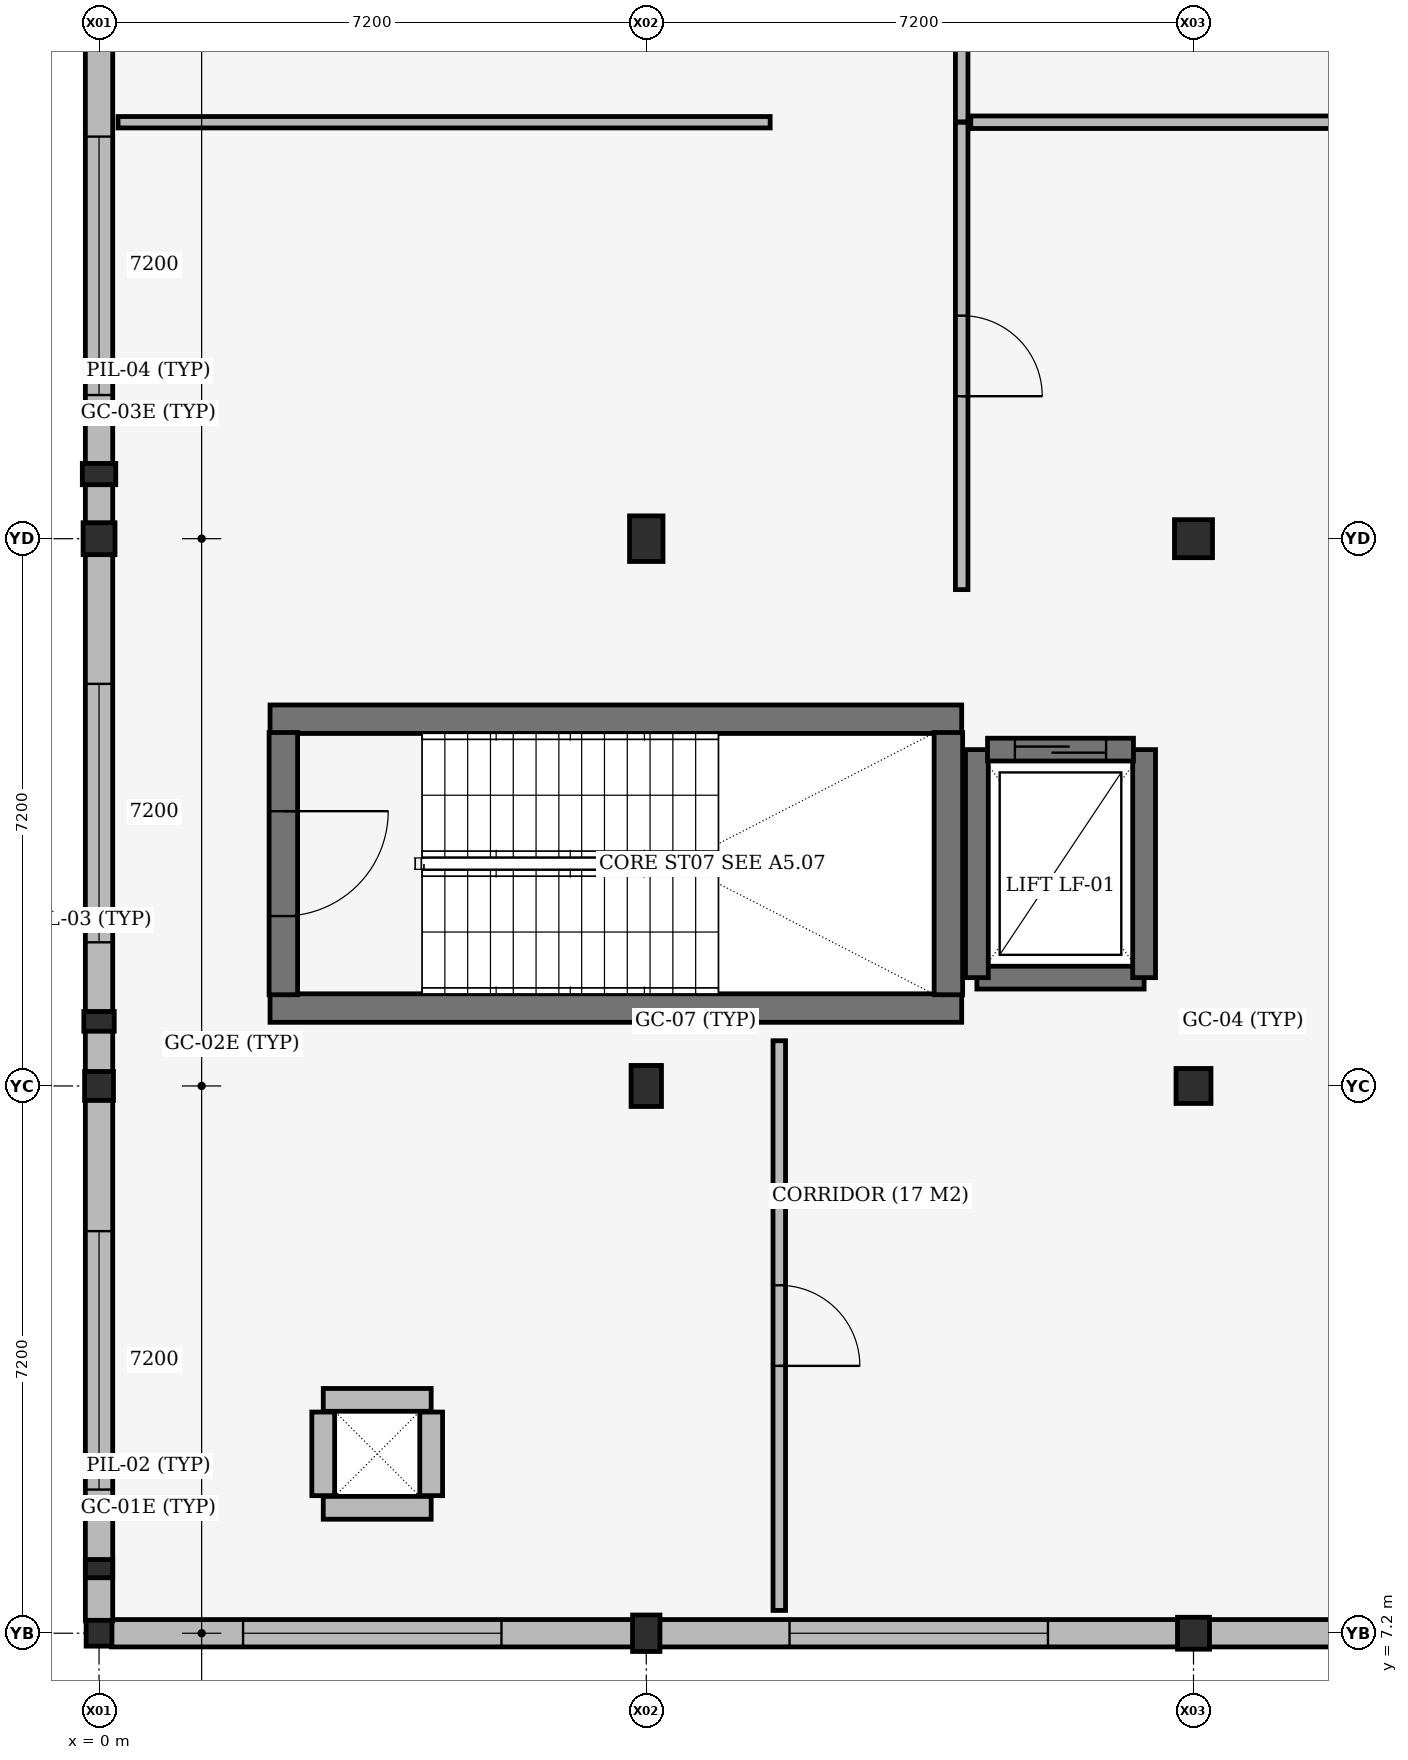
"""IFC4 building model, lengths in metres.
Left out: names, types, materials, properties, quantities, classifications, styles, units other than length and angle.
Written with IfcOpenShell. Run it as: python <this file> out.ifc"""

import sys

from ifc_helpers import new_model, si_unit, direction, frame, frame_2d, origin, origin_2d, place, context, subcontext, project, spatial, rectangle, extrude, element, fill, save


model = new_model("IFC4")
c1 = context("Model", 3, precision=1e-05, world=origin(), true_north=direction((0.0, 1.0)))
c2 = subcontext(c1, "Body", "Model", "MODEL_VIEW")
j1 = project(units=[si_unit("LENGTHUNIT", "METRE"), si_unit("PLANEANGLEUNIT", "RADIAN")], contexts=[c1])
p1 = place(None, origin())
s1 = spatial("IfcSite", under=j1, at=p1, CompositionType="ELEMENT")
p2 = place(p1, origin())
s2 = spatial("IfcBuilding", under=s1, at=p2, CompositionType="ELEMENT")
p3 = place(p2, frame((0.0, 0.0, 9.6)))
s3 = spatial("IfcBuildingStorey", under=s2, at=p3, CompositionType="ELEMENT", Elevation=9.6)
p4 = place(p3, frame((2.95, 8.85, 0.0), z_axis=(0.0, 0.0, 1.0), x_axis=(1.0, 0.0, 0.0)))
e1 = element("IfcWall", 1, at=p4, inside=s3, PredefinedType="SHEAR", context=c2, shape_type="SweptSolid", body=[
    extrude(rectangle(XDim=1.42, YDim=0.3, at=frame_2d((0.71, 0.0))), origin(), (0.0, 0.0, 1.0), 3.96),
])
p5 = place(p3, frame((4.37, 9.01, 0.0), z_axis=(0.0, 0.0, 1.0), x_axis=(0.0, 1.0, 0.0)))
e2 = element("IfcWall", 2, at=p5, inside=s3, PredefinedType="SHEAR", context=c2, shape_type="SweptSolid", body=[
    extrude(rectangle(XDim=1.1, YDim=0.3, at=frame_2d((0.55, 0.0))), origin(), (0.0, 0.0, 1.0), 3.96),
])
p6 = place(p3, frame((4.37, 10.27, 0.0), z_axis=(0.0, 0.0, 1.0), x_axis=(-1.0, 0.0, 0.0)))
e3 = element("IfcWall", 3, at=p6, inside=s3, PredefinedType="SHEAR", context=c2, shape_type="SweptSolid", body=[
    extrude(rectangle(XDim=1.42, YDim=0.3, at=frame_2d((0.71, 0.0))), origin(), (0.0, 0.0, 1.0), 3.96),
])
p7 = place(p3, frame((2.95, 10.11, 0.0), z_axis=(0.0, 0.0, 1.0), x_axis=(0.0, -1.0, 0.0)))
e4 = element("IfcWall", 4, at=p7, inside=s3, PredefinedType="SHEAR", context=c2, shape_type="SweptSolid", body=[
    extrude(rectangle(XDim=1.1, YDim=0.3, at=frame_2d((0.55, 0.0))), origin(), (0.0, 0.0, 1.0), 3.96),
])
p8 = place(p3, frame((0.0, 7.2, 0.0), z_axis=(0.0, 0.0, 1.0), x_axis=(1.0, 0.0, 0.0)))
e5 = element("IfcColumn", 5, at=p8, inside=s3, PredefinedType="COLUMN", context=c2, shape_type="SweptSolid", body=[
    extrude(rectangle(XDim=0.34, YDim=0.34, at=origin_2d()), origin(), (0.0, 0.0, 1.0), 3.89),
])
p9 = place(p3, frame((0.0, 14.4, 0.0), z_axis=(0.0, 0.0, 1.0), x_axis=(1.0, 0.0, 0.0)))
e6 = element("IfcColumn", 6, at=p9, inside=s3, PredefinedType="COLUMN", context=c2, shape_type="SweptSolid", body=[
    extrude(rectangle(XDim=0.38, YDim=0.38, at=origin_2d()), origin(), (0.0, 0.0, 1.0), 3.89),
])
p10 = place(p3, frame((0.0, 21.6, 0.0), z_axis=(0.0, 0.0, 1.0), x_axis=(1.0, 0.0, 0.0)))
e7 = element("IfcColumn", 7, at=p10, inside=s3, PredefinedType="COLUMN", context=c2, shape_type="SweptSolid", body=[
    extrude(rectangle(XDim=0.42, YDim=0.42, at=origin_2d()), origin(), (0.0, 0.0, 1.0), 3.89),
])
p11 = place(p3, frame((7.2, 7.2, 0.0), z_axis=(0.0, 0.0, 1.0), x_axis=(1.0, 0.0, 0.0)))
e8 = element("IfcColumn", 8, at=p11, inside=s3, PredefinedType="COLUMN", context=c2, shape_type="SweptSolid", body=[
    extrude(rectangle(XDim=0.36, YDim=0.48, at=origin_2d()), origin(), (0.0, 0.0, 1.0), 3.89),
])
p12 = place(p3, frame((7.2, 14.4, 0.0), z_axis=(0.0, 0.0, 1.0), x_axis=(1.0, 0.0, 0.0)))
e9 = element("IfcColumn", 9, at=p12, inside=s3, PredefinedType="COLUMN", context=c2, shape_type="SweptSolid", body=[
    extrude(rectangle(XDim=0.4, YDim=0.54, at=origin_2d()), origin(), (0.0, 0.0, 1.0), 3.89),
])
p13 = place(p3, frame((7.2, 21.6, 0.0), z_axis=(0.0, 0.0, 1.0), x_axis=(1.0, 0.0, 0.0)))
e10 = element("IfcColumn", 10, at=p13, inside=s3, PredefinedType="COLUMN", context=c2, shape_type="SweptSolid", body=[
    extrude(rectangle(XDim=0.44, YDim=0.6, at=origin_2d()), origin(), (0.0, 0.0, 1.0), 3.89),
])
p14 = place(p3, frame((14.4, 7.2, 0.0), z_axis=(0.0, 0.0, 1.0), x_axis=(1.0, 0.0, 0.0)))
e11 = element("IfcColumn", 11, at=p14, inside=s3, PredefinedType="COLUMN", context=c2, shape_type="SweptSolid", body=[
    extrude(rectangle(XDim=0.42, YDim=0.42, at=origin_2d()), origin(), (0.0, 0.0, 1.0), 3.89),
])
p15 = place(p3, frame((14.4, 14.4, 0.0), z_axis=(0.0, 0.0, 1.0), x_axis=(1.0, 0.0, 0.0)))
e12 = element("IfcColumn", 12, at=p15, inside=s3, PredefinedType="COLUMN", context=c2, shape_type="SweptSolid", body=[
    extrude(rectangle(XDim=0.46, YDim=0.46, at=origin_2d()), origin(), (0.0, 0.0, 1.0), 3.89),
])
p16 = place(p3, frame((14.4, 21.6, 0.0), z_axis=(0.0, 0.0, 1.0), x_axis=(1.0, 0.0, 0.0)))
e13 = element("IfcColumn", 13, at=p16, inside=s3, PredefinedType="COLUMN", context=c2, shape_type="SweptSolid", body=[
    extrude(rectangle(XDim=0.5, YDim=0.5, at=origin_2d()), origin(), (0.0, 0.0, 1.0), 3.89),
])
p17 = place(p3, frame((0.0, 8.05, 0.0), z_axis=(0.0, 0.0, 1.0), x_axis=(1.0, 0.0, 0.0)))
e14 = element("IfcColumn", 14, at=p17, inside=s3, PredefinedType="PILASTER", context=c2, shape_type="SweptSolid", body=[
    extrude(rectangle(XDim=0.36, YDim=0.24, at=origin_2d()), origin(), (0.0, 0.0, 1.0), 3.89),
])
p18 = place(p3, frame((0.0, 15.25, 0.0), z_axis=(0.0, 0.0, 1.0), x_axis=(1.0, 0.0, 0.0)))
e15 = element("IfcColumn", 15, at=p18, inside=s3, PredefinedType="PILASTER", context=c2, shape_type="SweptSolid", body=[
    extrude(rectangle(XDim=0.4, YDim=0.26, at=origin_2d()), origin(), (0.0, 0.0, 1.0), 3.89),
])
p19 = place(p3, frame((0.0, 22.45, 0.0), z_axis=(0.0, 0.0, 1.0), x_axis=(1.0, 0.0, 0.0)))
e16 = element("IfcColumn", 16, at=p19, inside=s3, PredefinedType="PILASTER", context=c2, shape_type="SweptSolid", body=[
    extrude(rectangle(XDim=0.44, YDim=0.28, at=origin_2d()), origin(), (0.0, 0.0, 1.0), 3.89),
])
for number, where, z_axis, x_axis in (
    (17, (2.25, 15.425, 0.0), (0.0, 0.0, 1.0), (1.0, 0.0, 0.0)),
    (18, (11.35, 19.225, 0.0), (0.0, 0.0, 1.0), (-1.0, 0.0, 0.0)),
):
    element("IfcWall", number, at=place(p3, frame(where, z_axis=z_axis, x_axis=x_axis)), inside=s3, PredefinedType="SHEAR", context=c2, shape_type="SweptSolid", body=[
        extrude(rectangle(XDim=9.1, YDim=0.375, at=frame_2d((4.55, 0.0))), origin(), (0.0, 0.0, 1.0), 3.89),
    ])
p20 = place(p3, frame((11.175, 15.6, 0.0), z_axis=(0.0, 0.0, 1.0), x_axis=(0.0, 1.0, 0.0)))
e19 = element("IfcWall", 19, at=p20, inside=s3, PredefinedType="SHEAR", context=c2, shape_type="SweptSolid", body=[
    extrude(rectangle(XDim=3.45, YDim=0.375, at=frame_2d((1.725, 0.0))), origin(), (0.0, 0.0, 1.0), 3.89),
])
p21 = place(p3, frame((11.55, 15.825, 0.0), z_axis=(0.0, 0.0, 1.0), x_axis=(1.0, 0.0, 0.0)))
e20 = element("IfcWall", 20, at=p21, inside=s3, PredefinedType="SHEAR", context=c2, shape_type="SweptSolid", body=[
    extrude(rectangle(XDim=2.2, YDim=0.3, at=frame_2d((1.1, 0.0))), origin(), (0.0, 0.0, 1.0), 3.89),
])
for number, where, z_axis, x_axis in (
    (21, (11.55, 18.825, 0.0), (0.0, 0.0, 1.0), (0.0, -1.0, 0.0)),
    (22, (13.75, 15.825, 0.0), (0.0, 0.0, 1.0), (0.0, 1.0, 0.0)),
):
    element("IfcWall", number, at=place(p3, frame(where, z_axis=z_axis, x_axis=x_axis)), inside=s3, PredefinedType="SHEAR", context=c2, shape_type="SweptSolid", body=[
        extrude(rectangle(XDim=3.0, YDim=0.3, at=frame_2d((1.5, 0.0))), origin(), (0.0, 0.0, 1.0), 3.89),
    ])
p22 = place(p3, frame((7.028, 7.2, 0.0), z_axis=(0.0, 0.0, 1.0), x_axis=(-1.0, 0.0, 0.0)))
e23 = element("IfcWall", 23, at=p22, inside=s3, PredefinedType="STANDARD", context=c2, shape_type="SweptSolid", body=[
    extrude(rectangle(XDim=6.866, YDim=0.36, at=frame_2d((3.433, 0.0))), origin(), (0.0, 0.0, 1.0), 3.15),
])
p23 = place(p22, frame((1.733, 0.0, 0.9)))
e24 = element("IfcOpeningElement", 24, at=p23, cuts=e23, PredefinedType="OPENING", context=c2, shape_type="SweptSolid", body=[
    extrude(rectangle(XDim=3.4, YDim=1.5, at=frame_2d((1.7, 0.75))), frame((0.0, 0.19, 0.0), z_axis=(0.0, -1.0, 0.0), x_axis=(1.0, 0.0, 0.0)), (0.0, 0.0, 1.0), 0.38),
])
p24 = place(p3, frame((14.198, 7.2, 0.0), z_axis=(0.0, 0.0, 1.0), x_axis=(-1.0, 0.0, 0.0)))
e25 = element("IfcWall", 25, at=p24, inside=s3, PredefinedType="STANDARD", context=c2, shape_type="SweptSolid", body=[
    extrude(rectangle(XDim=6.826, YDim=0.36, at=frame_2d((3.413, 0.0))), origin(), (0.0, 0.0, 1.0), 3.15),
])
p25 = place(p24, frame((1.713, 0.0, 0.9)))
e26 = element("IfcOpeningElement", 26, at=p25, cuts=e25, PredefinedType="OPENING", context=c2, shape_type="SweptSolid", body=[
    extrude(rectangle(XDim=3.4, YDim=1.5, at=frame_2d((1.7, 0.75))), frame((0.0, 0.19, 0.0), z_axis=(0.0, -1.0, 0.0), x_axis=(1.0, 0.0, 0.0)), (0.0, 0.0, 1.0), 0.38),
])
p26 = place(p3, frame((21.388, 7.2, 0.0), z_axis=(0.0, 0.0, 1.0), x_axis=(-1.0, 0.0, 0.0)))
e27 = element("IfcWall", 27, at=p26, inside=s3, PredefinedType="STANDARD", context=c2, shape_type="SweptSolid", body=[
    extrude(rectangle(XDim=6.786, YDim=0.36, at=frame_2d((3.393, 0.0))), origin(), (0.0, 0.0, 1.0), 3.25),
])
p27 = place(p26, frame((1.693, 0.0, 0.9)))
e28 = element("IfcOpeningElement", 28, at=p27, cuts=e27, PredefinedType="OPENING", context=c2, shape_type="SweptSolid", body=[
    extrude(rectangle(XDim=3.4, YDim=1.5, at=frame_2d((1.7, 0.75))), frame((0.0, 0.19, 0.0), z_axis=(0.0, -1.0, 0.0), x_axis=(1.0, 0.0, 0.0)), (0.0, 0.0, 1.0), 0.38),
])
p28 = place(p3, frame((0.0, 7.362, 0.0), z_axis=(0.0, 0.0, 1.0), x_axis=(0.0, 1.0, 0.0)))
e29 = element("IfcWall", 29, at=p28, inside=s3, PredefinedType="STANDARD", context=c2, shape_type="SweptSolid", body=[
    extrude(rectangle(XDim=6.856, YDim=0.36, at=frame_2d((3.428, 0.0))), origin(), (0.0, 0.0, 1.0), 3.25),
])
p29 = place(p28, frame((1.728, 0.0, 0.9)))
e30 = element("IfcOpeningElement", 30, at=p29, cuts=e29, PredefinedType="OPENING", context=c2, shape_type="SweptSolid", body=[
    extrude(rectangle(XDim=3.4, YDim=1.5, at=frame_2d((1.7, 0.75))), frame((0.0, 0.19, 0.0), z_axis=(0.0, -1.0, 0.0), x_axis=(1.0, 0.0, 0.0)), (0.0, 0.0, 1.0), 0.38),
])
p30 = place(p3, frame((0.0, 14.582, 0.0), z_axis=(0.0, 0.0, 1.0), x_axis=(0.0, 1.0, 0.0)))
e31 = element("IfcWall", 31, at=p30, inside=s3, PredefinedType="STANDARD", context=c2, shape_type="SweptSolid", body=[
    extrude(rectangle(XDim=6.816, YDim=0.36, at=frame_2d((3.408, 0.0))), origin(), (0.0, 0.0, 1.0), 3.21),
])
p31 = place(p30, frame((1.708, 0.0, 0.9)))
e32 = element("IfcOpeningElement", 32, at=p31, cuts=e31, PredefinedType="OPENING", context=c2, shape_type="SweptSolid", body=[
    extrude(rectangle(XDim=3.4, YDim=1.5, at=frame_2d((1.7, 0.75))), frame((0.0, 0.19, 0.0), z_axis=(0.0, -1.0, 0.0), x_axis=(1.0, 0.0, 0.0)), (0.0, 0.0, 1.0), 0.38),
])
p32 = place(p3, frame((0.0, 21.802, 0.0), z_axis=(0.0, 0.0, 1.0), x_axis=(0.0, 1.0, 0.0)))
e33 = element("IfcWall", 33, at=p32, inside=s3, PredefinedType="STANDARD", context=c2, shape_type="SweptSolid", body=[
    extrude(rectangle(XDim=6.776, YDim=0.36, at=frame_2d((3.388, 0.0))), origin(), (0.0, 0.0, 1.0), 3.15),
])
p33 = place(p32, frame((1.688, 0.0, 0.9)))
e34 = element("IfcOpeningElement", 34, at=p33, cuts=e33, PredefinedType="OPENING", context=c2, shape_type="SweptSolid", body=[
    extrude(rectangle(XDim=3.4, YDim=1.5, at=frame_2d((1.7, 0.75))), frame((0.0, 0.19, 0.0), z_axis=(0.0, -1.0, 0.0), x_axis=(1.0, 0.0, 0.0)), (0.0, 0.0, 1.0), 0.38),
])
p34 = place(p3, frame((2.425, 19.05, 0.0), z_axis=(0.0, 0.0, 1.0), x_axis=(0.0, -1.0, 0.0)))
e35 = element("IfcWall", 35, at=p34, inside=s3, PredefinedType="SHEAR", context=c2, shape_type="SweptSolid", body=[
    extrude(rectangle(XDim=3.45, YDim=0.375, at=frame_2d((1.725, 0.0))), origin(), (0.0, 0.0, 1.0), 3.89),
])
p35 = place(p34, frame((1.035, 0.0, 0.0)))
e36 = element("IfcOpeningElement", 36, at=p35, cuts=e35, PredefinedType="OPENING", context=c2, shape_type="SweptSolid", body=[
    extrude(rectangle(XDim=1.38, YDim=2.2, at=frame_2d((0.69, 1.1))), frame((0.0, 0.198, 0.0), z_axis=(0.0, -1.0, 0.0), x_axis=(1.0, 0.0, 0.0)), (0.0, 0.0, 1.0), 0.395),
])
p36 = place(p3, frame((11.69, 18.825, 0.0), z_axis=(0.0, 0.0, 1.0), x_axis=(1.0, 0.0, 0.0)))
e37 = element("IfcWall", 37, at=p36, inside=s3, PredefinedType="SHEAR", context=c2, shape_type="SweptSolid", body=[
    extrude(rectangle(XDim=1.92, YDim=0.3, at=frame_2d((0.96, 0.0))), origin(), (0.0, 0.0, 1.0), 3.89),
])
p37 = place(p36, frame((0.36, 0.0, 0.0)))
e38 = element("IfcOpeningElement", 38, at=p37, cuts=e37, PredefinedType="OPENING", context=c2, shape_type="SweptSolid", body=[
    extrude(rectangle(XDim=1.2, YDim=2.1, at=frame_2d((0.6, 1.05))), frame((0.0, 0.16, 0.0), z_axis=(0.0, -1.0, 0.0), x_axis=(1.0, 0.0, 0.0)), (0.0, 0.0, 1.0), 0.32),
])
p38 = place(p3, frame((8.95, 7.5, 0.0), z_axis=(0.0, 0.0, 1.0), x_axis=(0.0, 1.0, 0.0)))
e39 = element("IfcWall", 39, at=p38, inside=s3, PredefinedType="PARTITIONING", context=c2, shape_type="SweptSolid", body=[
    extrude(rectangle(XDim=7.495, YDim=0.165, at=frame_2d((3.748, 0.0))), origin(), (0.0, 0.0, 1.0), 3.25),
])
p39 = place(p38, frame((3.218, 0.0, 0.0)))
e40 = element("IfcOpeningElement", 40, at=p39, cuts=e39, PredefinedType="OPENING", context=c2, shape_type="SweptSolid", body=[
    extrude(rectangle(XDim=1.06, YDim=2.2, at=frame_2d((0.53, 1.1))), frame((0.0, 0.093, 0.0), z_axis=(0.0, -1.0, 0.0), x_axis=(1.0, 0.0, 0.0)), (0.0, 0.0, 1.0), 0.185),
])
p40 = place(p3, frame((0.25, 27.079, 0.0), z_axis=(0.0, 0.0, 1.0), x_axis=(1.0, 0.0, 0.0)))
e41 = element("IfcWall", 41, at=p40, inside=s3, PredefinedType="PARTITIONING", context=c2, shape_type="SweptSolid", body=[
    extrude(rectangle(XDim=8.58, YDim=0.15, at=frame_2d((4.29, 0.0))), origin(), (0.0, 0.0, 1.0), 3.37),
])
p41 = place(p3, frame((11.35, 20.93, 0.0), z_axis=(0.0, 0.0, 1.0), x_axis=(0.0, 1.0, 0.0)))
e42 = element("IfcWall", 42, at=p41, inside=s3, PredefinedType="PARTITIONING", context=c2, shape_type="SweptSolid", body=[
    extrude(rectangle(XDim=6.149, YDim=0.165, at=frame_2d((3.075, 0.0))), origin(), (0.0, 0.0, 1.0), 3.21),
])
p42 = place(p41, frame((2.544, 0.0, 0.0)))
e43 = element("IfcOpeningElement", 43, at=p42, cuts=e42, PredefinedType="OPENING", context=c2, shape_type="SweptSolid", body=[
    extrude(rectangle(XDim=1.06, YDim=2.2, at=frame_2d((0.53, 1.1))), frame((0.0, 0.093, 0.0), z_axis=(0.0, -1.0, 0.0), x_axis=(1.0, 0.0, 0.0)), (0.0, 0.0, 1.0), 0.185),
])
p43 = place(p3, frame((11.47, 27.079, 0.0), z_axis=(0.0, 0.0, 1.0), x_axis=(1.0, 0.0, 0.0)))
e44 = element("IfcWall", 44, at=p43, inside=s3, PredefinedType="PARTITIONING", context=c2, shape_type="SweptSolid", body=[
    extrude(rectangle(XDim=18.91, YDim=0.165, at=frame_2d((9.455, 0.0))), origin(), (0.0, 0.0, 1.0), 3.15),
])
p44 = place(p3, frame((11.35, 27.084, 0.0), z_axis=(0.0, 0.0, 1.0), x_axis=(0.0, 1.0, 0.0)))
e45 = element("IfcWall", 45, at=p44, inside=s3, PredefinedType="PARTITIONING", context=c2, shape_type="SweptSolid", body=[
    extrude(rectangle(XDim=24.469, YDim=0.165, at=frame_2d((12.234, 0.0))), origin(), (0.0, 0.0, 1.0), 3.15),
])
p45 = place(p44, frame((11.709, 0.0, 0.0)))
e46 = element("IfcOpeningElement", 46, at=p45, cuts=e45, PredefinedType="OPENING", context=c2, shape_type="SweptSolid", body=[
    extrude(rectangle(XDim=1.05, YDim=2.2, at=frame_2d((0.525, 1.1))), frame((0.0, 0.093, 0.0), z_axis=(0.0, -1.0, 0.0), x_axis=(1.0, 0.0, 0.0)), (0.0, 0.0, 1.0), 0.185),
])
p46 = place(p23, origin())
e47 = element("IfcWindow", 47, at=p46, inside=s3, PartitioningType="DOUBLE_PANEL_VERTICAL", PredefinedType="WINDOW", context=c2, shape_type="SweptSolid", body=[
    extrude(rectangle(XDim=3.4, YDim=1.5, at=frame_2d((1.7, 0.75))), frame((0.0, 0.03, 0.0), z_axis=(0.0, -1.0, 0.0), x_axis=(1.0, 0.0, 0.0)), (0.0, 0.0, 1.0), 0.06),
])
fill(e24, e47)
p47 = place(p25, origin())
e48 = element("IfcWindow", 48, at=p47, inside=s3, PartitioningType="DOUBLE_PANEL_VERTICAL", PredefinedType="WINDOW", context=c2, shape_type="SweptSolid", body=[
    extrude(rectangle(XDim=3.4, YDim=1.5, at=frame_2d((1.7, 0.75))), frame((0.0, 0.03, 0.0), z_axis=(0.0, -1.0, 0.0), x_axis=(1.0, 0.0, 0.0)), (0.0, 0.0, 1.0), 0.06),
])
fill(e26, e48)
p48 = place(p29, origin())
e49 = element("IfcWindow", 49, at=p48, inside=s3, PartitioningType="DOUBLE_PANEL_VERTICAL", PredefinedType="WINDOW", context=c2, shape_type="SweptSolid", body=[
    extrude(rectangle(XDim=3.4, YDim=1.5, at=frame_2d((1.7, 0.75))), frame((0.0, 0.03, 0.0), z_axis=(0.0, -1.0, 0.0), x_axis=(1.0, 0.0, 0.0)), (0.0, 0.0, 1.0), 0.06),
])
fill(e30, e49)
p49 = place(p31, origin())
e50 = element("IfcWindow", 50, at=p49, inside=s3, PartitioningType="DOUBLE_PANEL_VERTICAL", PredefinedType="WINDOW", context=c2, shape_type="SweptSolid", body=[
    extrude(rectangle(XDim=3.4, YDim=1.5, at=frame_2d((1.7, 0.75))), frame((0.0, 0.03, 0.0), z_axis=(0.0, -1.0, 0.0), x_axis=(1.0, 0.0, 0.0)), (0.0, 0.0, 1.0), 0.06),
])
fill(e32, e50)
p50 = place(p33, origin())
e51 = element("IfcWindow", 51, at=p50, inside=s3, PartitioningType="DOUBLE_PANEL_VERTICAL", PredefinedType="WINDOW", context=c2, shape_type="SweptSolid", body=[
    extrude(rectangle(XDim=3.4, YDim=1.5, at=frame_2d((1.7, 0.75))), frame((0.0, 0.03, 0.0), z_axis=(0.0, -1.0, 0.0), x_axis=(1.0, 0.0, 0.0)), (0.0, 0.0, 1.0), 0.06),
])
fill(e34, e51)
p51 = place(p35, origin())
e52 = element("IfcDoor", 52, at=p51, inside=s3, OperationType="DOUBLE_DOOR_SINGLE_SWING", PredefinedType="DOOR", context=c2, shape_type="SweptSolid", body=[
    extrude(rectangle(XDim=1.38, YDim=2.2, at=frame_2d((0.69, 1.1))), frame((0.0, 0.025, 0.0), z_axis=(0.0, -1.0, 0.0), x_axis=(1.0, 0.0, 0.0)), (0.0, 0.0, 1.0), 0.05),
])
fill(e36, e52)
p52 = place(p37, origin())
e53 = element("IfcDoor", 53, at=p52, inside=s3, OperationType="SLIDING_TO_LEFT", PredefinedType="DOOR", context=c2, shape_type="SweptSolid", body=[
    extrude(rectangle(XDim=1.2, YDim=2.1, at=frame_2d((0.6, 1.05))), frame((0.0, 0.025, 0.0), z_axis=(0.0, -1.0, 0.0), x_axis=(1.0, 0.0, 0.0)), (0.0, 0.0, 1.0), 0.05),
])
fill(e38, e53)
p53 = place(p39, origin())
e54 = element("IfcDoor", 54, at=p53, inside=s3, OperationType="SINGLE_SWING_RIGHT", PredefinedType="DOOR", context=c2, shape_type="SweptSolid", body=[
    extrude(rectangle(XDim=1.06, YDim=2.2, at=frame_2d((0.53, 1.1))), frame((0.0, 0.025, 0.0), z_axis=(0.0, -1.0, 0.0), x_axis=(1.0, 0.0, 0.0)), (0.0, 0.0, 1.0), 0.05),
])
fill(e40, e54)
p54 = place(p42, origin())
e55 = element("IfcDoor", 55, at=p54, inside=s3, OperationType="SINGLE_SWING_RIGHT", PredefinedType="DOOR", context=c2, shape_type="SweptSolid", body=[
    extrude(rectangle(XDim=1.06, YDim=2.2, at=frame_2d((0.53, 1.1))), frame((0.0, 0.025, 0.0), z_axis=(0.0, -1.0, 0.0), x_axis=(1.0, 0.0, 0.0)), (0.0, 0.0, 1.0), 0.05),
])
fill(e43, e55)
save(model, sys.argv[1])
